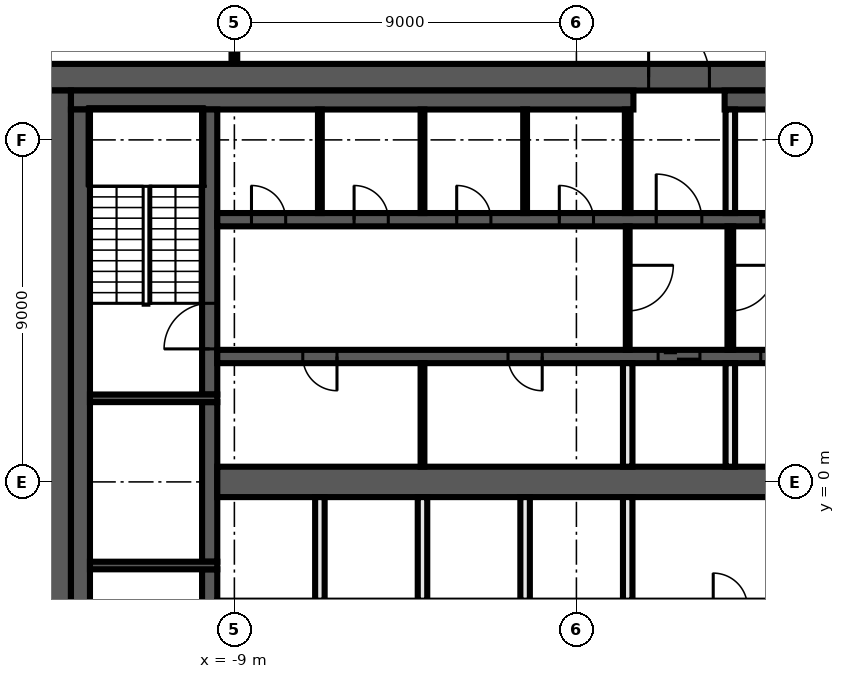
"""IFC4 building model, lengths in metres.
Left out: names, types, materials, properties, quantities, classifications, styles, units other than length and angle.
Written with IfcOpenShell. Run it as: python <this file> out.ifc"""

import sys

from ifc_helpers import new_model, si_unit, direction, frame, frame_2d, origin, place, context, subcontext, project, spatial, rectangle, extrude, element, fill, save


model = new_model("IFC4")
c1 = context("Model", 3, precision=1e-05, world=origin(), true_north=direction((0.0, 1.0)))
c2 = subcontext(c1, "Body", "Model", "MODEL_VIEW")
j1 = project(units=[si_unit("LENGTHUNIT", "METRE"), si_unit("PLANEANGLEUNIT", "RADIAN")], contexts=[c1])
p1 = place(None, origin())
s1 = spatial("IfcSite", under=j1, at=p1, CompositionType="ELEMENT")
p2 = place(p1, origin())
s2 = spatial("IfcBuilding", under=s1, at=p2, CompositionType="ELEMENT")
p3 = place(p2, frame((0.0, 0.0, 241.2)))
s3 = spatial("IfcBuildingStorey", under=s2, at=p3, CompositionType="ELEMENT", Elevation=241.2)
p4 = place(p3, frame((-9.0, 11.0, 0.0), z_axis=(0.0, 0.0, 1.0), x_axis=(0.0, 1.0, 0.0)))
e1 = element("IfcWall", 1, at=p4, inside=s3, PredefinedType="PARTITIONING", context=c2, shape_type="SweptSolid", body=[
    extrude(rectangle(XDim=2.925, YDim=0.15, at=frame_2d((1.462, 0.0))), origin(), (0.0, 0.0, 1.0), 3.82),
])
p5 = place(p3, frame((-14.0, 10.65, 0.0), z_axis=(0.0, 0.0, 1.0), x_axis=(1.0, 0.0, 0.0)))
e2 = element("IfcWall", 2, at=p5, inside=s3, PredefinedType="SHEAR", context=c2, shape_type="SweptSolid", body=[
    extrude(rectangle(XDim=28.0, YDim=0.7, at=frame_2d((14.0, 0.0))), origin(), (0.0, 0.0, 1.0), 3.82),
])
p6 = place(p5, frame((15.9, 0.0, 0.0)))
e3 = element("IfcOpeningElement", 3, at=p6, cuts=e2, PredefinedType="OPENING", context=c2, shape_type="SweptSolid", body=[
    extrude(rectangle(XDim=1.6, YDim=2.1, at=frame_2d((0.8, 1.05))), frame((0.0, 0.36, 0.0), z_axis=(0.0, -1.0, 0.0), x_axis=(1.0, 0.0, 0.0)), (0.0, 0.0, 1.0), 0.72),
])
p7 = place(p3, frame((-13.65, -10.3, 0.0), z_axis=(0.0, 0.0, 1.0), x_axis=(0.0, 1.0, 0.0)))
e4 = element("IfcWall", 4, at=p7, inside=s3, PredefinedType="SHEAR", context=c2, shape_type="SweptSolid", body=[
    extrude(rectangle(XDim=20.6, YDim=0.7, at=frame_2d((10.3, 0.0))), origin(), (0.0, 0.0, 1.0), 3.82),
])
p8 = place(p3, frame((-13.3, 10.05, 0.0), z_axis=(0.0, 0.0, 1.0), x_axis=(1.0, 0.0, 0.0)))
e5 = element("IfcWall", 5, at=p8, inside=s3, PredefinedType="SHEAR", context=c2, shape_type="SweptSolid", body=[
    extrude(rectangle(XDim=14.8, YDim=0.5, at=frame_2d((7.4, 0.0))), origin(), (0.0, 0.0, 1.0), 3.82),
])
p9 = place(p3, frame((3.9, 10.05, 0.0), z_axis=(0.0, 0.0, 1.0), x_axis=(1.0, 0.0, 0.0)))
e6 = element("IfcWall", 6, at=p9, inside=s3, PredefinedType="SHEAR", context=c2, shape_type="SweptSolid", body=[
    extrude(rectangle(XDim=9.4, YDim=0.5, at=frame_2d((4.7, 0.0))), origin(), (0.0, 0.0, 1.0), 3.82),
])
p10 = place(p3, frame((-13.05, -9.8, 0.0), z_axis=(0.0, 0.0, 1.0), x_axis=(0.0, 1.0, 0.0)))
e7 = element("IfcWall", 7, at=p10, inside=s3, PredefinedType="SHEAR", context=c2, shape_type="SweptSolid", body=[
    extrude(rectangle(XDim=19.6, YDim=0.5, at=frame_2d((9.8, 0.0))), origin(), (0.0, 0.0, 1.0), 3.82),
])
p11 = place(p3, frame((-9.65, -9.8, 0.0), z_axis=(0.0, 0.0, 1.0), x_axis=(0.0, 1.0, 0.0)))
e8 = element("IfcWall", 8, at=p11, inside=s3, PredefinedType="SHEAR", context=c2, shape_type="SweptSolid", body=[
    extrude(rectangle(XDim=7.5, YDim=0.4, at=frame_2d((3.75, 0.0))), origin(), (0.0, 0.0, 1.0), 3.82),
])
p12 = place(p11, frame((5.1, 0.0, 0.0)))
e9 = element("IfcOpeningElement", 9, at=p12, cuts=e8, PredefinedType="OPENING", context=c2, shape_type="SweptSolid", body=[
    extrude(rectangle(XDim=1.2, YDim=2.1, at=frame_2d((0.6, 1.05))), frame((0.0, 0.21, 0.0), z_axis=(0.0, -1.0, 0.0), x_axis=(1.0, 0.0, 0.0)), (0.0, 0.0, 1.0), 0.42),
])
p13 = place(p3, frame((-9.65, -2.1, 0.0), z_axis=(0.0, 0.0, 1.0), x_axis=(0.0, 1.0, 0.0)))
e10 = element("IfcWall", 10, at=p13, inside=s3, PredefinedType="SHEAR", context=c2, shape_type="SweptSolid", body=[
    extrude(rectangle(XDim=4.2, YDim=0.4, at=frame_2d((2.1, 0.0))), origin(), (0.0, 0.0, 1.0), 3.82),
])
p14 = place(p3, frame((-9.65, 2.3, 0.0), z_axis=(0.0, 0.0, 1.0), x_axis=(0.0, 1.0, 0.0)))
e11 = element("IfcWall", 11, at=p14, inside=s3, PredefinedType="SHEAR", context=c2, shape_type="SweptSolid", body=[
    extrude(rectangle(XDim=7.5, YDim=0.4, at=frame_2d((3.75, 0.0))), origin(), (0.0, 0.0, 1.0), 3.82),
])
p15 = place(p14, frame((1.2, 0.0, 0.0)))
e12 = element("IfcOpeningElement", 12, at=p15, cuts=e11, PredefinedType="OPENING", context=c2, shape_type="SweptSolid", body=[
    extrude(rectangle(XDim=1.2, YDim=2.1, at=frame_2d((0.6, 1.05))), frame((0.0, 0.21, 0.0), z_axis=(0.0, -1.0, 0.0), x_axis=(1.0, 0.0, 0.0)), (0.0, 0.0, 1.0), 0.42),
])
for number, where, z_axis, x_axis in (
    (13, (-9.45, 2.2, 0.0), (0.0, 0.0, 1.0), (-1.0, 0.0, 0.0)),
    (14, (-9.45, -2.2, 0.0), (0.0, 0.0, 1.0), (-1.0, 0.0, 0.0)),
):
    element("IfcWall", number, at=place(p3, frame(where, z_axis=z_axis, x_axis=x_axis)), inside=s3, PredefinedType="SHEAR", context=c2, shape_type="SweptSolid", body=[
        extrude(rectangle(XDim=3.35, YDim=0.2, at=frame_2d((1.675, 0.0))), origin(), (0.0, 0.0, 1.0), 3.82),
    ])
p16 = place(p3, frame((-9.45, 6.9, 0.0), z_axis=(0.0, 0.0, 1.0), x_axis=(1.0, 0.0, 0.0)))
e15 = element("IfcWall", 15, at=p16, inside=s3, PredefinedType="SHEAR", context=c2, shape_type="SweptSolid", body=[
    extrude(rectangle(XDim=18.9, YDim=0.35, at=frame_2d((9.45, 0.0))), origin(), (0.0, 0.0, 1.0), 3.82),
])
p17 = place(p16, frame((11.55, 0.0, 0.0)))
e16 = element("IfcOpeningElement", 16, at=p17, cuts=e15, PredefinedType="OPENING", context=c2, shape_type="SweptSolid", body=[
    extrude(rectangle(XDim=1.2, YDim=2.1, at=frame_2d((0.6, 1.05))), frame((0.0, 0.185, 0.0), z_axis=(0.0, -1.0, 0.0), x_axis=(1.0, 0.0, 0.0)), (0.0, 0.0, 1.0), 0.37),
])
p18 = place(p16, frame((14.3, 0.0, 0.0)))
e17 = element("IfcOpeningElement", 17, at=p18, cuts=e15, PredefinedType="OPENING", context=c2, shape_type="SweptSolid", body=[
    extrude(rectangle(XDim=1.1, YDim=2.1, at=frame_2d((0.55, 1.05))), frame((0.0, 0.185, 0.0), z_axis=(0.0, -1.0, 0.0), x_axis=(1.0, 0.0, 0.0)), (0.0, 0.0, 1.0), 0.37),
])
p19 = place(p16, frame((17.0, 0.0, 0.0)))
e18 = element("IfcOpeningElement", 18, at=p19, cuts=e15, PredefinedType="OPENING", context=c2, shape_type="SweptSolid", body=[
    extrude(rectangle(XDim=1.1, YDim=2.1, at=frame_2d((0.55, 1.05))), frame((0.0, 0.185, 0.0), z_axis=(0.0, -1.0, 0.0), x_axis=(1.0, 0.0, 0.0)), (0.0, 0.0, 1.0), 0.37),
])
p20 = place(p16, frame((0.9, 0.0, 0.0)))
e19 = element("IfcOpeningElement", 19, at=p20, cuts=e15, PredefinedType="OPENING", context=c2, shape_type="SweptSolid", body=[
    extrude(rectangle(XDim=0.9, YDim=2.1, at=frame_2d((0.45, 1.05))), frame((0.0, 0.185, 0.0), z_axis=(0.0, -1.0, 0.0), x_axis=(1.0, 0.0, 0.0)), (0.0, 0.0, 1.0), 0.37),
])
p21 = place(p16, frame((3.6, 0.0, 0.0)))
e20 = element("IfcOpeningElement", 20, at=p21, cuts=e15, PredefinedType="OPENING", context=c2, shape_type="SweptSolid", body=[
    extrude(rectangle(XDim=0.9, YDim=2.1, at=frame_2d((0.45, 1.05))), frame((0.0, 0.185, 0.0), z_axis=(0.0, -1.0, 0.0), x_axis=(1.0, 0.0, 0.0)), (0.0, 0.0, 1.0), 0.37),
])
p22 = place(p16, frame((6.3, 0.0, 0.0)))
e21 = element("IfcOpeningElement", 21, at=p22, cuts=e15, PredefinedType="OPENING", context=c2, shape_type="SweptSolid", body=[
    extrude(rectangle(XDim=0.9, YDim=2.1, at=frame_2d((0.45, 1.05))), frame((0.0, 0.185, 0.0), z_axis=(0.0, -1.0, 0.0), x_axis=(1.0, 0.0, 0.0)), (0.0, 0.0, 1.0), 0.37),
])
p23 = place(p16, frame((9.0, 0.0, 0.0)))
e22 = element("IfcOpeningElement", 22, at=p23, cuts=e15, PredefinedType="OPENING", context=c2, shape_type="SweptSolid", body=[
    extrude(rectangle(XDim=0.9, YDim=2.1, at=frame_2d((0.45, 1.05))), frame((0.0, 0.185, 0.0), z_axis=(0.0, -1.0, 0.0), x_axis=(1.0, 0.0, 0.0)), (0.0, 0.0, 1.0), 0.37),
])
p24 = place(p3, frame((9.45, 3.3, 0.0), z_axis=(0.0, 0.0, 1.0), x_axis=(-1.0, 0.0, 0.0)))
e23 = element("IfcWall", 23, at=p24, inside=s3, PredefinedType="SHEAR", context=c2, shape_type="SweptSolid", body=[
    extrude(rectangle(XDim=18.9, YDim=0.35, at=frame_2d((9.45, 0.0))), origin(), (0.0, 0.0, 1.0), 3.82),
])
p25 = place(p24, frame((6.2, 0.0, 0.0)))
e24 = element("IfcOpeningElement", 24, at=p25, cuts=e23, PredefinedType="OPENING", context=c2, shape_type="SweptSolid", body=[
    extrude(rectangle(XDim=1.1, YDim=2.1, at=frame_2d((0.55, 1.05))), frame((0.0, 0.185, 0.0), z_axis=(0.0, -1.0, 0.0), x_axis=(1.0, 0.0, 0.0)), (0.0, 0.0, 1.0), 0.37),
])
p26 = place(p24, frame((3.5, 0.0, 0.0)))
e25 = element("IfcOpeningElement", 25, at=p26, cuts=e23, PredefinedType="OPENING", context=c2, shape_type="SweptSolid", body=[
    extrude(rectangle(XDim=1.1, YDim=2.1, at=frame_2d((0.55, 1.05))), frame((0.0, 0.185, 0.0), z_axis=(0.0, -1.0, 0.0), x_axis=(1.0, 0.0, 0.0)), (0.0, 0.0, 1.0), 0.37),
])
p27 = place(p24, frame((0.9, 0.0, 0.0)))
e26 = element("IfcOpeningElement", 26, at=p27, cuts=e23, PredefinedType="OPENING", context=c2, shape_type="SweptSolid", body=[
    extrude(rectangle(XDim=0.9, YDim=2.1, at=frame_2d((0.45, 1.05))), frame((0.0, 0.185, 0.0), z_axis=(0.0, -1.0, 0.0), x_axis=(1.0, 0.0, 0.0)), (0.0, 0.0, 1.0), 0.37),
])
p28 = place(p24, frame((15.75, 0.0, 0.0)))
e27 = element("IfcOpeningElement", 27, at=p28, cuts=e23, PredefinedType="OPENING", context=c2, shape_type="SweptSolid", body=[
    extrude(rectangle(XDim=0.9, YDim=2.1, at=frame_2d((0.45, 1.05))), frame((0.0, 0.185, 0.0), z_axis=(0.0, -1.0, 0.0), x_axis=(1.0, 0.0, 0.0)), (0.0, 0.0, 1.0), 0.37),
])
p29 = place(p24, frame((10.35, 0.0, 0.0)))
e28 = element("IfcOpeningElement", 28, at=p29, cuts=e23, PredefinedType="OPENING", context=c2, shape_type="SweptSolid", body=[
    extrude(rectangle(XDim=0.9, YDim=2.1, at=frame_2d((0.45, 1.05))), frame((0.0, 0.185, 0.0), z_axis=(0.0, -1.0, 0.0), x_axis=(1.0, 0.0, 0.0)), (0.0, 0.0, 1.0), 0.37),
])
p30 = place(p3, frame((-9.45, 0.0, 0.0), z_axis=(0.0, 0.0, 1.0), x_axis=(1.0, 0.0, 0.0)))
e29 = element("IfcWall", 29, at=p30, inside=s3, PredefinedType="SHEAR", context=c2, shape_type="SweptSolid", body=[
    extrude(rectangle(XDim=18.9, YDim=0.8, at=frame_2d((9.45, 0.0))), origin(), (0.0, 0.0, 1.0), 3.82),
])
p31 = place(p3, frame((4.05, 6.725, 0.0), z_axis=(0.0, 0.0, 1.0), x_axis=(0.0, -1.0, 0.0)))
e30 = element("IfcWall", 30, at=p31, inside=s3, PredefinedType="PARTITIONING", context=c2, shape_type="SweptSolid", body=[
    extrude(rectangle(XDim=3.25, YDim=0.15, at=frame_2d((1.625, 0.0))), origin(), (0.0, 0.0, 1.0), 3.82),
])
p32 = place(p31, frame((1.025, 0.0, 0.0)))
e31 = element("IfcOpeningElement", 31, at=p32, cuts=e30, PredefinedType="OPENING", context=c2, shape_type="SweptSolid", body=[
    extrude(rectangle(XDim=1.2, YDim=2.1, at=frame_2d((0.6, 1.05))), frame((0.0, 0.085, 0.0), z_axis=(0.0, -1.0, 0.0), x_axis=(1.0, 0.0, 0.0)), (0.0, 0.0, 1.0), 0.17),
])
for number, where, z_axis, x_axis in (
    (32, (4.05, 0.4, 0.0), (0.0, 0.0, 1.0), (0.0, 1.0, 0.0)),
    (33, (4.05, 7.075, 0.0), (0.0, 0.0, 1.0), (0.0, 1.0, 0.0)),
):
    element("IfcWall", number, at=place(p3, frame(where, z_axis=z_axis, x_axis=x_axis)), inside=s3, PredefinedType="SOLIDWALL", context=c2, shape_type="SweptSolid", body=[
        extrude(rectangle(XDim=2.725, YDim=0.25, at=frame_2d((1.363, 0.0))), origin(), (0.0, 0.0, 1.0), 3.82),
    ])
p33 = place(p3, frame((1.35, 7.075, 0.0), z_axis=(0.0, 0.0, 1.0), x_axis=(0.0, 1.0, 0.0)))
e34 = element("IfcWall", 34, at=p33, inside=s3, PredefinedType="PARTITIONING", context=c2, shape_type="SweptSolid", body=[
    extrude(rectangle(XDim=2.725, YDim=0.15, at=frame_2d((1.363, 0.0))), origin(), (0.0, 0.0, 1.0), 3.82),
])
p34 = place(p3, frame((1.35, 6.725, 0.0), z_axis=(0.0, 0.0, 1.0), x_axis=(0.0, -1.0, 0.0)))
e35 = element("IfcWall", 35, at=p34, inside=s3, PredefinedType="PARTITIONING", context=c2, shape_type="SweptSolid", body=[
    extrude(rectangle(XDim=3.25, YDim=0.1, at=frame_2d((1.625, 0.0))), origin(), (0.0, 0.0, 1.0), 3.82),
])
p35 = place(p34, frame((1.025, 0.0, 0.0)))
e36 = element("IfcOpeningElement", 36, at=p35, cuts=e35, PredefinedType="OPENING", context=c2, shape_type="SweptSolid", body=[
    extrude(rectangle(XDim=1.2, YDim=2.1, at=frame_2d((0.6, 1.05))), frame((0.0, 0.06, 0.0), z_axis=(0.0, -1.0, 0.0), x_axis=(1.0, 0.0, 0.0)), (0.0, 0.0, 1.0), 0.12),
])
for number, where, z_axis, x_axis in (
    (37, (1.35, -3.125, 0.0), (0.0, 0.0, 1.0), (0.0, 1.0, 0.0)),
    (38, (1.35, 0.4, 0.0), (0.0, 0.0, 1.0), (0.0, 1.0, 0.0)),
):
    element("IfcWall", number, at=place(p3, frame(where, z_axis=z_axis, x_axis=x_axis)), inside=s3, PredefinedType="SOLIDWALL", context=c2, shape_type="SweptSolid", body=[
        extrude(rectangle(XDim=2.725, YDim=0.25, at=frame_2d((1.363, 0.0))), origin(), (0.0, 0.0, 1.0), 3.82),
    ])
p36 = place(p3, frame((-1.35, 7.075, 0.0), z_axis=(0.0, 0.0, 1.0), x_axis=(0.0, 1.0, 0.0)))
e39 = element("IfcWall", 39, at=p36, inside=s3, PredefinedType="PARTITIONING", context=c2, shape_type="SweptSolid", body=[
    extrude(rectangle(XDim=2.725, YDim=0.1, at=frame_2d((1.363, 0.0))), origin(), (0.0, 0.0, 1.0), 3.82),
])
p37 = place(p3, frame((-1.35, -3.125, 0.0), z_axis=(0.0, 0.0, 1.0), x_axis=(0.0, 1.0, 0.0)))
e40 = element("IfcWall", 40, at=p37, inside=s3, PredefinedType="SOLIDWALL", context=c2, shape_type="SweptSolid", body=[
    extrude(rectangle(XDim=2.725, YDim=0.25, at=frame_2d((1.363, 0.0))), origin(), (0.0, 0.0, 1.0), 3.82),
])
for number, where, z_axis, x_axis in (
    (41, (-4.05, 0.4, 0.0), (0.0, 0.0, 1.0), (0.0, 1.0, 0.0)),
    (42, (-4.05, 7.075, 0.0), (0.0, 0.0, 1.0), (0.0, 1.0, 0.0)),
):
    element("IfcWall", number, at=place(p3, frame(where, z_axis=z_axis, x_axis=x_axis)), inside=s3, PredefinedType="PARTITIONING", context=c2, shape_type="SweptSolid", body=[
        extrude(rectangle(XDim=2.725, YDim=0.1, at=frame_2d((1.363, 0.0))), origin(), (0.0, 0.0, 1.0), 3.82),
    ])
p38 = place(p3, frame((-4.05, -3.125, 0.0), z_axis=(0.0, 0.0, 1.0), x_axis=(0.0, 1.0, 0.0)))
e43 = element("IfcWall", 43, at=p38, inside=s3, PredefinedType="SOLIDWALL", context=c2, shape_type="SweptSolid", body=[
    extrude(rectangle(XDim=2.725, YDim=0.25, at=frame_2d((1.363, 0.0))), origin(), (0.0, 0.0, 1.0), 3.82),
])
p39 = place(p3, frame((-6.75, 7.075, 0.0), z_axis=(0.0, 0.0, 1.0), x_axis=(0.0, 1.0, 0.0)))
e44 = element("IfcWall", 44, at=p39, inside=s3, PredefinedType="PARTITIONING", context=c2, shape_type="SweptSolid", body=[
    extrude(rectangle(XDim=2.725, YDim=0.1, at=frame_2d((1.363, 0.0))), origin(), (0.0, 0.0, 1.0), 3.82),
])
p40 = place(p3, frame((-6.75, -3.125, 0.0), z_axis=(0.0, 0.0, 1.0), x_axis=(0.0, 1.0, 0.0)))
e45 = element("IfcWall", 45, at=p40, inside=s3, PredefinedType="SOLIDWALL", context=c2, shape_type="SweptSolid", body=[
    extrude(rectangle(XDim=2.725, YDim=0.25, at=frame_2d((1.363, 0.0))), origin(), (0.0, 0.0, 1.0), 3.82),
])
p41 = place(p6, origin())
e46 = element("IfcDoor", 46, at=p41, inside=s3, OperationType="DOUBLE_DOOR_SINGLE_SWING", PredefinedType="DOOR", context=c2, shape_type="SweptSolid", body=[
    extrude(rectangle(XDim=1.6, YDim=2.1, at=frame_2d((0.8, 1.05))), frame((0.0, 0.025, 0.0), z_axis=(0.0, -1.0, 0.0), x_axis=(1.0, 0.0, 0.0)), (0.0, 0.0, 1.0), 0.05),
])
fill(e3, e46)
p42 = place(p17, origin())
e47 = element("IfcDoor", 47, at=p42, inside=s3, OperationType="SINGLE_SWING_LEFT", PredefinedType="DOOR", context=c2, shape_type="SweptSolid", body=[
    extrude(rectangle(XDim=1.2, YDim=2.1, at=frame_2d((0.6, 1.05))), frame((0.0, 0.025, 0.0), z_axis=(0.0, -1.0, 0.0), x_axis=(1.0, 0.0, 0.0)), (0.0, 0.0, 1.0), 0.05),
])
fill(e16, e47)
p43 = place(p18, origin())
e48 = element("IfcDoor", 48, at=p43, inside=s3, OperationType="DOUBLE_DOOR_SLIDING", PredefinedType="DOOR", context=c2, shape_type="SweptSolid", body=[
    extrude(rectangle(XDim=1.1, YDim=2.1, at=frame_2d((0.55, 1.05))), frame((0.0, 0.025, 0.0), z_axis=(0.0, -1.0, 0.0), x_axis=(1.0, 0.0, 0.0)), (0.0, 0.0, 1.0), 0.05),
])
fill(e17, e48)
p44 = place(p25, origin())
e49 = element("IfcDoor", 49, at=p44, inside=s3, OperationType="DOUBLE_DOOR_SLIDING", PredefinedType="DOOR", context=c2, shape_type="SweptSolid", body=[
    extrude(rectangle(XDim=1.1, YDim=2.1, at=frame_2d((0.55, 1.05))), frame((0.0, 0.025, 0.0), z_axis=(0.0, -1.0, 0.0), x_axis=(1.0, 0.0, 0.0)), (0.0, 0.0, 1.0), 0.05),
])
fill(e24, e49)
p45 = place(p26, origin())
e50 = element("IfcDoor", 50, at=p45, inside=s3, OperationType="DOUBLE_DOOR_SLIDING", PredefinedType="DOOR", context=c2, shape_type="SweptSolid", body=[
    extrude(rectangle(XDim=1.1, YDim=2.1, at=frame_2d((0.55, 1.05))), frame((0.0, 0.025, 0.0), z_axis=(0.0, -1.0, 0.0), x_axis=(1.0, 0.0, 0.0)), (0.0, 0.0, 1.0), 0.05),
])
fill(e25, e50)
p46 = place(p20, origin())
e51 = element("IfcDoor", 51, at=p46, inside=s3, OperationType="SINGLE_SWING_RIGHT", PredefinedType="DOOR", context=c2, shape_type="SweptSolid", body=[
    extrude(rectangle(XDim=0.9, YDim=2.1, at=frame_2d((0.45, 1.05))), frame((0.0, 0.025, 0.0), z_axis=(0.0, -1.0, 0.0), x_axis=(1.0, 0.0, 0.0)), (0.0, 0.0, 1.0), 0.05),
])
fill(e19, e51)
p47 = place(p21, origin())
e52 = element("IfcDoor", 52, at=p47, inside=s3, OperationType="SINGLE_SWING_LEFT", PredefinedType="DOOR", context=c2, shape_type="SweptSolid", body=[
    extrude(rectangle(XDim=0.9, YDim=2.1, at=frame_2d((0.45, 1.05))), frame((0.0, 0.025, 0.0), z_axis=(0.0, -1.0, 0.0), x_axis=(1.0, 0.0, 0.0)), (0.0, 0.0, 1.0), 0.05),
])
fill(e20, e52)
p48 = place(p22, origin())
e53 = element("IfcDoor", 53, at=p48, inside=s3, OperationType="SINGLE_SWING_RIGHT", PredefinedType="DOOR", context=c2, shape_type="SweptSolid", body=[
    extrude(rectangle(XDim=0.9, YDim=2.1, at=frame_2d((0.45, 1.05))), frame((0.0, 0.025, 0.0), z_axis=(0.0, -1.0, 0.0), x_axis=(1.0, 0.0, 0.0)), (0.0, 0.0, 1.0), 0.05),
])
fill(e21, e53)
p49 = place(p23, origin())
e54 = element("IfcDoor", 54, at=p49, inside=s3, OperationType="SINGLE_SWING_LEFT", PredefinedType="DOOR", context=c2, shape_type="SweptSolid", body=[
    extrude(rectangle(XDim=0.9, YDim=2.1, at=frame_2d((0.45, 1.05))), frame((0.0, 0.025, 0.0), z_axis=(0.0, -1.0, 0.0), x_axis=(1.0, 0.0, 0.0)), (0.0, 0.0, 1.0), 0.05),
])
fill(e22, e54)
p50 = place(p28, origin())
e55 = element("IfcDoor", 55, at=p50, inside=s3, OperationType="SINGLE_SWING_RIGHT", PredefinedType="DOOR", context=c2, shape_type="SweptSolid", body=[
    extrude(rectangle(XDim=0.9, YDim=2.1, at=frame_2d((0.45, 1.05))), frame((0.0, 0.025, 0.0), z_axis=(0.0, -1.0, 0.0), x_axis=(1.0, 0.0, 0.0)), (0.0, 0.0, 1.0), 0.05),
])
fill(e27, e55)
p51 = place(p29, origin())
e56 = element("IfcDoor", 56, at=p51, inside=s3, OperationType="SINGLE_SWING_LEFT", PredefinedType="DOOR", context=c2, shape_type="SweptSolid", body=[
    extrude(rectangle(XDim=0.9, YDim=2.1, at=frame_2d((0.45, 1.05))), frame((0.0, 0.025, 0.0), z_axis=(0.0, -1.0, 0.0), x_axis=(1.0, 0.0, 0.0)), (0.0, 0.0, 1.0), 0.05),
])
fill(e28, e56)
p52 = place(p15, origin())
e57 = element("IfcDoor", 57, at=p52, inside=s3, OperationType="SINGLE_SWING_RIGHT", PredefinedType="DOOR", context=c2, shape_type="SweptSolid", body=[
    extrude(rectangle(XDim=1.2, YDim=2.1, at=frame_2d((0.6, 1.05))), frame((0.0, 0.025, 0.0), z_axis=(0.0, -1.0, 0.0), x_axis=(1.0, 0.0, 0.0)), (0.0, 0.0, 1.0), 0.05),
])
fill(e12, e57)
p53 = place(p35, origin())
e58 = element("IfcDoor", 58, at=p53, inside=s3, OperationType="SINGLE_SWING_LEFT", PredefinedType="DOOR", context=c2, shape_type="SweptSolid", body=[
    extrude(rectangle(XDim=1.2, YDim=2.1, at=frame_2d((0.6, 1.05))), frame((0.0, 0.025, 0.0), z_axis=(0.0, -1.0, 0.0), x_axis=(1.0, 0.0, 0.0)), (0.0, 0.0, 1.0), 0.05),
])
fill(e36, e58)
p54 = place(p32, origin())
e59 = element("IfcDoor", 59, at=p54, inside=s3, OperationType="SINGLE_SWING_RIGHT", PredefinedType="DOOR", context=c2, shape_type="SweptSolid", body=[
    extrude(rectangle(XDim=1.2, YDim=2.1, at=frame_2d((0.6, 1.05))), frame((0.0, 0.025, 0.0), z_axis=(0.0, -1.0, 0.0), x_axis=(1.0, 0.0, 0.0)), (0.0, 0.0, 1.0), 0.05),
])
fill(e31, e59)
save(model, sys.argv[1])
